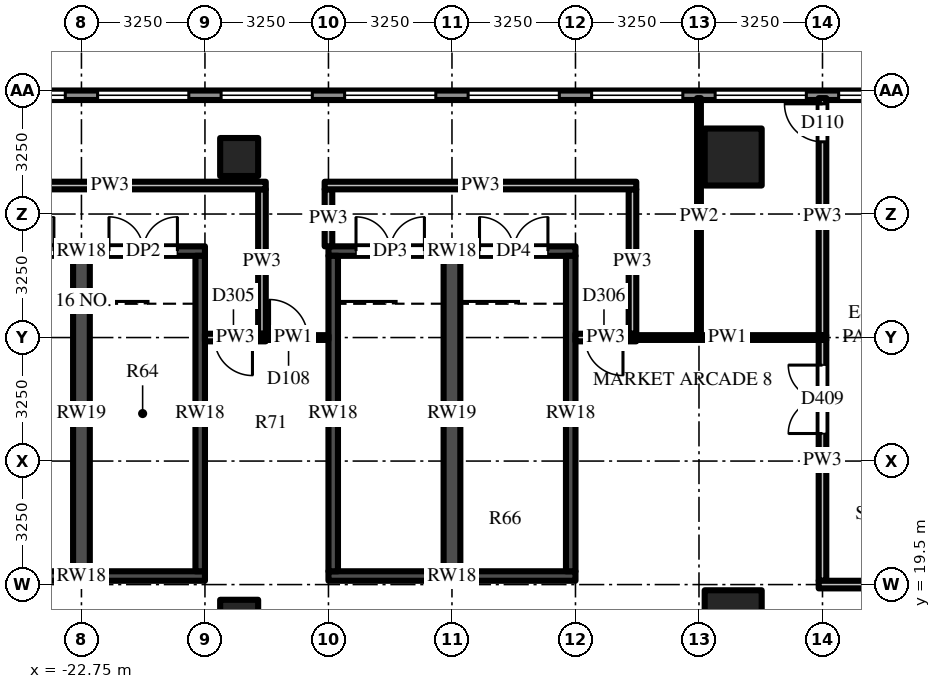
"""IFC4 building model, lengths in metres.
Left out: names, types, materials, properties, quantities, classifications, styles, units other than length and angle.
Written with IfcOpenShell. Run it as: python <this file> out.ifc"""

import sys

from ifc_helpers import new_model, si_unit, direction, frame, frame_2d, origin, origin_2d, place, context, subcontext, project, spatial, rectangle, extrude, source, transform, mapped, element, fill, save


model = new_model("IFC4")
c1 = context("Model", 3, precision=1e-05, world=origin(), true_north=direction((0.0, 1.0)))
c2 = subcontext(c1, "Body", "Model", "MODEL_VIEW")
j1 = project(units=[si_unit("LENGTHUNIT", "METRE"), si_unit("PLANEANGLEUNIT", "RADIAN")], contexts=[c1])
p1 = place(None, origin())
s1 = spatial("IfcSite", under=j1, at=p1, CompositionType="ELEMENT")
p2 = place(p1, origin())
s2 = spatial("IfcBuilding", under=s1, at=p2, CompositionType="ELEMENT")
p3 = place(p2, frame((0.0, 0.0, 29.0)))
s3 = spatial("IfcBuildingStorey", under=s2, at=p3, CompositionType="ELEMENT", Elevation=29.0)
m1 = source(origin(), c2, "Body", "SweptSolid", [
    extrude(rectangle(XDim=1.5, YDim=1.5, at=origin_2d()), origin(), (0.0, 0.0, 1.0), 5.0),
])
for number, where, z_axis, x_axis in (
    (1, (-5.6, 18.6, 0.0), (0.0, 0.0, 1.0), (1.0, 0.0, 0.0)),
    (2, (-5.6, 30.75, 0.0), (0.0, 0.0, 1.0), (1.0, 0.0, 0.0)),
):
    element("IfcColumn", number, at=place(p3, frame(where, z_axis=z_axis, x_axis=x_axis)), inside=s3, PredefinedType="COLUMN", context=c2, shape_type="MappedRepresentation", body=[
        mapped(m1, transform((0.0, 0.0, 0.0))),
    ])
m2 = source(origin(), c2, "Body", "SweptSolid", [
    extrude(rectangle(XDim=1.0, YDim=1.0, at=origin_2d()), origin(), (0.0, 0.0, 1.0), 5.0),
])
for number, where, z_axis, x_axis in (
    (3, (-18.6, 18.6, 0.0), (0.0, 0.0, 1.0), (1.0, 0.0, 0.0)),
    (4, (-18.6, 30.75, 0.0), (0.0, 0.0, 1.0), (1.0, 0.0, 0.0)),
):
    element("IfcColumn", number, at=place(p3, frame(where, z_axis=z_axis, x_axis=x_axis)), inside=s3, PredefinedType="COLUMN", context=c2, shape_type="MappedRepresentation", body=[
        mapped(m2, transform((0.0, 0.0, 0.0))),
    ])
m3 = source(origin(), c2, "Body", "SweptSolid", [
    extrude(rectangle(XDim=6.5, YDim=0.25, at=frame_2d((3.25, 0.0))), origin(), (0.0, 0.0, 1.0), 4.65),
])
p4 = place(p3, frame((-26.0, 28.275, 0.0), z_axis=(0.0, 0.0, 1.0), x_axis=(1.0, 0.0, 0.0)))
e5 = element("IfcWall", 5, at=p4, inside=s3, PredefinedType="SHEAR", context=c2, shape_type="MappedRepresentation", body=[
    mapped(m3, transform((0.0, 0.0, 0.0))),
])
m4 = source(origin(), c2, "Body", "SweptSolid", [
    extrude(rectangle(XDim=1.8, YDim=2.1, at=frame_2d((0.9, 1.05))), frame((0.0, 0.135, 0.0), z_axis=(0.0, -1.0, 0.0), x_axis=(1.0, 0.0, 0.0)), (0.0, 0.0, 1.0), 0.27),
])
p5 = place(p4, frame((0.725, 0.0, 0.0)))
e6 = element("IfcOpeningElement", 6, at=p5, cuts=e5, PredefinedType="OPENING", context=c2, shape_type="MappedRepresentation", body=[
    mapped(m4, transform((0.0, 0.0, 0.0))),
])
p6 = place(p4, frame((3.975, 0.0, 0.0)))
e7 = element("IfcOpeningElement", 7, at=p6, cuts=e5, PredefinedType="OPENING", context=c2, shape_type="MappedRepresentation", body=[
    mapped(m4, transform((0.0, 0.0, 0.0))),
])
p7 = place(p3, frame((-26.0, 19.725, 0.0), z_axis=(0.0, 0.0, 1.0), x_axis=(1.0, 0.0, 0.0)))
e8 = element("IfcWall", 8, at=p7, inside=s3, PredefinedType="SHEAR", context=c2, shape_type="MappedRepresentation", body=[
    mapped(m3, transform((0.0, 0.0, 0.0))),
])
m5 = source(origin(), c2, "Body", "SweptSolid", [
    extrude(rectangle(XDim=8.3, YDim=0.25, at=frame_2d((4.15, 0.0))), origin(), (0.0, 0.0, 1.0), 4.65),
])
p8 = place(p3, frame((-19.625, 19.85, 0.0), z_axis=(0.0, 0.0, 1.0), x_axis=(0.0, 1.0, 0.0)))
e9 = element("IfcWall", 9, at=p8, inside=s3, PredefinedType="SHEAR", context=c2, shape_type="MappedRepresentation", body=[
    mapped(m5, transform((0.0, 0.0, 0.0))),
])
m6 = source(origin(), c2, "Body", "SweptSolid", [
    extrude(rectangle(XDim=8.3, YDim=0.44, at=frame_2d((4.15, 0.0))), origin(), (0.0, 0.0, 1.0), 4.65),
])
p9 = place(p3, frame((-22.75, 19.85, 0.0), z_axis=(0.0, 0.0, 1.0), x_axis=(0.0, 1.0, 0.0)))
e10 = element("IfcWall", 10, at=p9, inside=s3, PredefinedType="SHEAR", context=c2, shape_type="MappedRepresentation", body=[
    mapped(m6, transform((0.0, 0.0, 0.0))),
])
p10 = place(p3, frame((-16.25, 28.275, 0.0), z_axis=(0.0, 0.0, 1.0), x_axis=(1.0, 0.0, 0.0)))
e11 = element("IfcWall", 11, at=p10, inside=s3, PredefinedType="SHEAR", context=c2, shape_type="MappedRepresentation", body=[
    mapped(m3, transform((0.0, 0.0, 0.0))),
])
p11 = place(p10, frame((0.725, 0.0, 0.0)))
e12 = element("IfcOpeningElement", 12, at=p11, cuts=e11, PredefinedType="OPENING", context=c2, shape_type="MappedRepresentation", body=[
    mapped(m4, transform((0.0, 0.0, 0.0))),
])
p12 = place(p10, frame((3.975, 0.0, 0.0)))
e13 = element("IfcOpeningElement", 13, at=p12, cuts=e11, PredefinedType="OPENING", context=c2, shape_type="MappedRepresentation", body=[
    mapped(m4, transform((0.0, 0.0, 0.0))),
])
p13 = place(p3, frame((-16.25, 19.725, 0.0), z_axis=(0.0, 0.0, 1.0), x_axis=(1.0, 0.0, 0.0)))
e14 = element("IfcWall", 14, at=p13, inside=s3, PredefinedType="SHEAR", context=c2, shape_type="MappedRepresentation", body=[
    mapped(m3, transform((0.0, 0.0, 0.0))),
])
for number, where, z_axis, x_axis in (
    (15, (-16.125, 19.85, 0.0), (0.0, 0.0, 1.0), (0.0, 1.0, 0.0)),
    (16, (-9.875, 19.85, 0.0), (0.0, 0.0, 1.0), (0.0, 1.0, 0.0)),
):
    element("IfcWall", number, at=place(p3, frame(where, z_axis=z_axis, x_axis=x_axis)), inside=s3, PredefinedType="SHEAR", context=c2, shape_type="MappedRepresentation", body=[
        mapped(m5, transform((0.0, 0.0, 0.0))),
    ])
p14 = place(p3, frame((-13.0, 19.85, 0.0), z_axis=(0.0, 0.0, 1.0), x_axis=(0.0, 1.0, 0.0)))
e17 = element("IfcWall", 17, at=p14, inside=s3, PredefinedType="SHEAR", context=c2, shape_type="MappedRepresentation", body=[
    mapped(m6, transform((0.0, 0.0, 0.0))),
])
m7 = source(origin(), c2, "Body", "SweptSolid", [
    extrude(rectangle(XDim=58.5, YDim=0.25, at=frame_2d((29.25, 0.0))), origin(), (0.0, 0.0, 1.0), 4.65),
])
p15 = place(p3, frame((29.25, 32.375, 0.0), z_axis=(0.0, 0.0, 1.0), x_axis=(-1.0, 0.0, 0.0)))
e18 = element("IfcWall", 18, at=p15, inside=s3, PredefinedType="SOLIDWALL", context=c2, shape_type="MappedRepresentation", body=[
    mapped(m7, transform((0.0, 0.0, 0.0))),
])
m8 = source(origin(), c2, "Body", "SweptSolid", [
    extrude(rectangle(XDim=2.4, YDim=3.3, at=frame_2d((1.2, 1.65))), frame((0.0, 0.135, 0.0), z_axis=(0.0, -1.0, 0.0), x_axis=(1.0, 0.0, 0.0)), (0.0, 0.0, 1.0), 0.27),
])
p16 = place(p15, frame((0.425, 0.0, 0.6)))
e19 = element("IfcOpeningElement", 19, at=p16, cuts=e18, PredefinedType="OPENING", context=c2, shape_type="MappedRepresentation", body=[
    mapped(m8, transform((0.0, 0.0, 0.0))),
])
p17 = place(p15, frame((3.675, 0.0, 0.6)))
e20 = element("IfcOpeningElement", 20, at=p17, cuts=e18, PredefinedType="OPENING", context=c2, shape_type="MappedRepresentation", body=[
    mapped(m8, transform((0.0, 0.0, 0.0))),
])
p18 = place(p15, frame((6.925, 0.0, 0.6)))
e21 = element("IfcOpeningElement", 21, at=p18, cuts=e18, PredefinedType="OPENING", context=c2, shape_type="MappedRepresentation", body=[
    mapped(m8, transform((0.0, 0.0, 0.0))),
])
p19 = place(p15, frame((10.175, 0.0, 0.6)))
e22 = element("IfcOpeningElement", 22, at=p19, cuts=e18, PredefinedType="OPENING", context=c2, shape_type="MappedRepresentation", body=[
    mapped(m8, transform((0.0, 0.0, 0.0))),
])
p20 = place(p15, frame((13.425, 0.0, 0.6)))
e23 = element("IfcOpeningElement", 23, at=p20, cuts=e18, PredefinedType="OPENING", context=c2, shape_type="MappedRepresentation", body=[
    mapped(m8, transform((0.0, 0.0, 0.0))),
])
p21 = place(p15, frame((16.675, 0.0, 0.6)))
e24 = element("IfcOpeningElement", 24, at=p21, cuts=e18, PredefinedType="OPENING", context=c2, shape_type="MappedRepresentation", body=[
    mapped(m8, transform((0.0, 0.0, 0.0))),
])
p22 = place(p15, frame((19.925, 0.0, 0.6)))
e25 = element("IfcOpeningElement", 25, at=p22, cuts=e18, PredefinedType="OPENING", context=c2, shape_type="MappedRepresentation", body=[
    mapped(m8, transform((0.0, 0.0, 0.0))),
])
p23 = place(p15, frame((23.175, 0.0, 0.6)))
e26 = element("IfcOpeningElement", 26, at=p23, cuts=e18, PredefinedType="OPENING", context=c2, shape_type="MappedRepresentation", body=[
    mapped(m8, transform((0.0, 0.0, 0.0))),
])
p24 = place(p15, frame((26.425, 0.0, 0.6)))
e27 = element("IfcOpeningElement", 27, at=p24, cuts=e18, PredefinedType="OPENING", context=c2, shape_type="MappedRepresentation", body=[
    mapped(m8, transform((0.0, 0.0, 0.0))),
])
p25 = place(p15, frame((29.675, 0.0, 0.6)))
e28 = element("IfcOpeningElement", 28, at=p25, cuts=e18, PredefinedType="OPENING", context=c2, shape_type="MappedRepresentation", body=[
    mapped(m8, transform((0.0, 0.0, 0.0))),
])
p26 = place(p15, frame((32.925, 0.0, 0.6)))
e29 = element("IfcOpeningElement", 29, at=p26, cuts=e18, PredefinedType="OPENING", context=c2, shape_type="MappedRepresentation", body=[
    mapped(m8, transform((0.0, 0.0, 0.0))),
])
p27 = place(p15, frame((36.175, 0.0, 0.6)))
e30 = element("IfcOpeningElement", 30, at=p27, cuts=e18, PredefinedType="OPENING", context=c2, shape_type="MappedRepresentation", body=[
    mapped(m8, transform((0.0, 0.0, 0.0))),
])
p28 = place(p15, frame((39.425, 0.0, 0.6)))
e31 = element("IfcOpeningElement", 31, at=p28, cuts=e18, PredefinedType="OPENING", context=c2, shape_type="MappedRepresentation", body=[
    mapped(m8, transform((0.0, 0.0, 0.0))),
])
p29 = place(p15, frame((42.675, 0.0, 0.6)))
e32 = element("IfcOpeningElement", 32, at=p29, cuts=e18, PredefinedType="OPENING", context=c2, shape_type="MappedRepresentation", body=[
    mapped(m8, transform((0.0, 0.0, 0.0))),
])
p30 = place(p15, frame((45.925, 0.0, 0.6)))
e33 = element("IfcOpeningElement", 33, at=p30, cuts=e18, PredefinedType="OPENING", context=c2, shape_type="MappedRepresentation", body=[
    mapped(m8, transform((0.0, 0.0, 0.0))),
])
p31 = place(p15, frame((49.175, 0.0, 0.6)))
e34 = element("IfcOpeningElement", 34, at=p31, cuts=e18, PredefinedType="OPENING", context=c2, shape_type="MappedRepresentation", body=[
    mapped(m8, transform((0.0, 0.0, 0.0))),
])
p32 = place(p15, frame((52.425, 0.0, 0.6)))
e35 = element("IfcOpeningElement", 35, at=p32, cuts=e18, PredefinedType="OPENING", context=c2, shape_type="MappedRepresentation", body=[
    mapped(m8, transform((0.0, 0.0, 0.0))),
])
p33 = place(p15, frame((55.675, 0.0, 0.6)))
e36 = element("IfcOpeningElement", 36, at=p33, cuts=e18, PredefinedType="OPENING", context=c2, shape_type="MappedRepresentation", body=[
    mapped(m8, transform((0.0, 0.0, 0.0))),
])
m9 = source(origin(), c2, "Body", "SweptSolid", [
    extrude(rectangle(XDim=3.8, YDim=0.2, at=frame_2d((1.9, 0.0))), origin(), (0.0, 0.0, 1.0), 4.224),
])
p34 = place(p3, frame((-18.0, 26.1, 0.0), z_axis=(0.0, 0.0, 1.0), x_axis=(0.0, 1.0, 0.0)))
e37 = element("IfcWall", 37, at=p34, inside=s3, PredefinedType="PARTITIONING", context=c2, shape_type="MappedRepresentation", body=[
    mapped(m9, transform((0.0, 0.0, 0.0))),
])
m10 = source(origin(), c2, "Body", "SweptSolid", [
    extrude(rectangle(XDim=1.5, YDim=0.2, at=frame_2d((0.75, 0.0))), origin(), (0.0, 0.0, 1.0), 4.65),
])
p35 = place(p3, frame((-16.25, 28.4, 0.0), z_axis=(0.0, 0.0, 1.0), x_axis=(0.0, 1.0, 0.0)))
e38 = element("IfcWall", 38, at=p35, inside=s3, PredefinedType="PARTITIONING", context=c2, shape_type="MappedRepresentation", body=[
    mapped(m10, transform((0.0, 0.0, 0.0))),
])
p36 = place(p3, frame((-8.25, 26.1, 0.0), z_axis=(0.0, 0.0, 1.0), x_axis=(0.0, 1.0, 0.0)))
e39 = element("IfcWall", 39, at=p36, inside=s3, PredefinedType="PARTITIONING", context=c2, shape_type="MappedRepresentation", body=[
    mapped(m9, transform((0.0, 0.0, 0.0))),
])
m11 = source(origin(), c2, "Body", "SweptSolid", [
    extrude(rectangle(XDim=6.238, YDim=0.1, at=frame_2d((3.119, 0.0))), origin(), (0.0, 0.0, 1.0), 3.73),
])
p37 = place(p3, frame((-6.5, 26.062, 0.0), z_axis=(0.0, 0.0, 1.0), x_axis=(0.0, 1.0, 0.0)))
e40 = element("IfcWall", 40, at=p37, inside=s3, PredefinedType="PARTITIONING", context=c2, shape_type="MappedRepresentation", body=[
    mapped(m11, transform((0.0, 0.0, 0.0))),
])
m12 = source(origin(), c2, "Body", "SweptSolid", [
    extrude(rectangle(XDim=3.188, YDim=0.2, at=frame_2d((1.594, 0.0))), origin(), (0.0, 0.0, 1.0), 4.65),
])
p38 = place(p3, frame((-3.25, 22.75, 0.0), z_axis=(0.0, 0.0, 1.0), x_axis=(0.0, 1.0, 0.0)))
e41 = element("IfcWall", 41, at=p38, inside=s3, PredefinedType="PARTITIONING", context=c2, shape_type="MappedRepresentation", body=[
    mapped(m12, transform((0.0, 0.0, 0.0))),
])
m13 = source(origin(), c2, "Body", "SweptSolid", [
    extrude(rectangle(XDim=1.8, YDim=2.1, at=frame_2d((0.9, 1.05))), frame((0.0, 0.11, 0.0), z_axis=(0.0, -1.0, 0.0), x_axis=(1.0, 0.0, 0.0)), (0.0, 0.0, 1.0), 0.22),
])
p39 = place(p38, frame((0.725, 0.0, 0.0)))
e42 = element("IfcOpeningElement", 42, at=p39, cuts=e41, PredefinedType="OPENING", context=c2, shape_type="MappedRepresentation", body=[
    mapped(m13, transform((0.0, 0.0, 0.0))),
])
m14 = source(origin(), c2, "Body", "SweptSolid", [
    extrude(rectangle(XDim=3.15, YDim=0.2, at=frame_2d((1.575, 0.0))), origin(), (0.0, 0.0, 1.0), 4.65),
])
p40 = place(p3, frame((-3.25, 19.6, 0.0), z_axis=(0.0, 0.0, 1.0), x_axis=(0.0, 1.0, 0.0)))
e43 = element("IfcWall", 43, at=p40, inside=s3, PredefinedType="PARTITIONING", context=c2, shape_type="MappedRepresentation", body=[
    mapped(m14, transform((0.0, 0.0, 0.0))),
])
m15 = source(origin(), c2, "Body", "SweptSolid", [
    extrude(rectangle(XDim=6.238, YDim=0.2, at=frame_2d((3.119, 0.0))), origin(), (0.0, 0.0, 1.0), 3.73),
])
p41 = place(p3, frame((-3.25, 26.062, 0.0), z_axis=(0.0, 0.0, 1.0), x_axis=(0.0, 1.0, 0.0)))
e44 = element("IfcWall", 44, at=p41, inside=s3, PredefinedType="PARTITIONING", context=c2, shape_type="MappedRepresentation", body=[
    mapped(m15, transform((0.0, 0.0, 0.0))),
])
m16 = source(origin(), c2, "Body", "SweptSolid", [
    extrude(rectangle(XDim=1.0, YDim=2.1, at=frame_2d((0.5, 1.05))), frame((0.0, 0.11, 0.0), z_axis=(0.0, -1.0, 0.0), x_axis=(1.0, 0.0, 0.0)), (0.0, 0.0, 1.0), 0.22),
])
p42 = place(p41, frame((5.087, 0.0, 0.0)))
e45 = element("IfcOpeningElement", 45, at=p42, cuts=e44, PredefinedType="OPENING", context=c2, shape_type="MappedRepresentation", body=[
    mapped(m16, transform((0.0, 0.0, 0.0))),
])
m17 = source(origin(), c2, "Body", "SweptSolid", [
    extrude(rectangle(XDim=1.85, YDim=0.2, at=frame_2d((0.925, 0.0))), origin(), (0.0, 0.0, 1.0), 3.947),
])
p43 = place(p3, frame((-1.5, 19.5, 0.0), z_axis=(0.0, 0.0, 1.0), x_axis=(-1.0, 0.0, 0.0)))
e46 = element("IfcWall", 46, at=p43, inside=s3, PredefinedType="PARTITIONING", context=c2, shape_type="MappedRepresentation", body=[
    mapped(m17, transform((0.0, 0.0, 0.0))),
])
m18 = source(origin(), c2, "Body", "SweptSolid", [
    extrude(rectangle(XDim=1.6, YDim=0.2, at=frame_2d((0.8, 0.0))), origin(), (0.0, 0.0, 1.0), 3.712),
])
p44 = place(p3, frame((-17.9, 26.0, 0.0), z_axis=(0.0, 0.0, 1.0), x_axis=(-1.0, 0.0, 0.0)))
e47 = element("IfcWall", 47, at=p44, inside=s3, PredefinedType="PARTITIONING", context=c2, shape_type="MappedRepresentation", body=[
    mapped(m18, transform((0.0, 0.0, 0.0))),
])
p45 = place(p44, frame((0.35, 0.0, 0.0)))
e48 = element("IfcOpeningElement", 48, at=p45, cuts=e47, PredefinedType="OPENING", context=c2, shape_type="MappedRepresentation", body=[
    mapped(m16, transform((0.0, 0.0, 0.0))),
])
m19 = source(origin(), c2, "Body", "SweptSolid", [
    extrude(rectangle(XDim=1.6, YDim=0.2, at=frame_2d((0.8, 0.0))), origin(), (0.0, 0.0, 1.0), 4.65),
])
p46 = place(p3, frame((-8.15, 26.0, 0.0), z_axis=(0.0, 0.0, 1.0), x_axis=(-1.0, 0.0, 0.0)))
e49 = element("IfcWall", 49, at=p46, inside=s3, PredefinedType="PARTITIONING", context=c2, shape_type="MappedRepresentation", body=[
    mapped(m19, transform((0.0, 0.0, 0.0))),
])
p47 = place(p46, frame((0.35, 0.0, 0.0)))
e50 = element("IfcOpeningElement", 50, at=p47, cuts=e49, PredefinedType="OPENING", context=c2, shape_type="MappedRepresentation", body=[
    mapped(m16, transform((0.0, 0.0, 0.0))),
])
m20 = source(origin(), c2, "Body", "SweptSolid", [
    extrude(rectangle(XDim=1.85, YDim=0.125, at=frame_2d((0.925, 0.0))), origin(), (0.0, 0.0, 1.0), 4.65),
])
p48 = place(p3, frame((-18.1, 26.0, 0.0), z_axis=(0.0, 0.0, 1.0), x_axis=(1.0, 0.0, 0.0)))
e51 = element("IfcWall", 51, at=p48, inside=s3, PredefinedType="PARTITIONING", context=c2, shape_type="MappedRepresentation", body=[
    mapped(m20, transform((0.0, 0.0, 0.0))),
])
m21 = source(origin(), c2, "Body", "SweptSolid", [
    extrude(rectangle(XDim=1.0, YDim=2.1, at=frame_2d((0.5, 1.05))), frame((0.0, 0.073, 0.0), z_axis=(0.0, -1.0, 0.0), x_axis=(1.0, 0.0, 0.0)), (0.0, 0.0, 1.0), 0.145),
])
p49 = place(p48, frame((0.3, 0.0, 0.0)))
e52 = element("IfcOpeningElement", 52, at=p49, cuts=e51, PredefinedType="OPENING", context=c2, shape_type="MappedRepresentation", body=[
    mapped(m21, transform((0.0, 0.0, 0.0))),
])
m22 = source(origin(), c2, "Body", "SweptSolid", [
    extrude(rectangle(XDim=5.2, YDim=0.125, at=frame_2d((2.6, 0.0))), origin(), (0.0, 0.0, 1.0), 2.83),
])
p50 = place(p3, frame((-8.35, 26.0, 0.0), z_axis=(0.0, 0.0, 1.0), x_axis=(1.0, 0.0, 0.0)))
e53 = element("IfcWall", 53, at=p50, inside=s3, PredefinedType="PARTITIONING", context=c2, shape_type="MappedRepresentation", body=[
    mapped(m22, transform((0.0, 0.0, 0.0))),
])
m23 = source(origin(), c2, "Body", "SweptSolid", [
    extrude(rectangle(XDim=8.2, YDim=0.2, at=frame_2d((4.1, 0.0))), origin(), (0.0, 0.0, 1.0), 3.712),
])
p51 = place(p3, frame((-17.9, 30.0, 0.0), z_axis=(0.0, 0.0, 1.0), x_axis=(-1.0, 0.0, 0.0)))
e54 = element("IfcWall", 54, at=p51, inside=s3, PredefinedType="PARTITIONING", context=c2, shape_type="MappedRepresentation", body=[
    mapped(m23, transform((0.0, 0.0, 0.0))),
])
m24 = source(origin(), c2, "Body", "SweptSolid", [
    extrude(rectangle(XDim=8.2, YDim=0.2, at=frame_2d((4.1, 0.0))), origin(), (0.0, 0.0, 1.0), 4.65),
])
p52 = place(p3, frame((-8.15, 30.0, 0.0), z_axis=(0.0, 0.0, 1.0), x_axis=(-1.0, 0.0, 0.0)))
e55 = element("IfcWall", 55, at=p52, inside=s3, PredefinedType="PARTITIONING", context=c2, shape_type="MappedRepresentation", body=[
    mapped(m24, transform((0.0, 0.0, 0.0))),
])
m25 = source(origin(), c2, "Body", "SweptSolid", [
    extrude(rectangle(XDim=1.8, YDim=2.1, at=frame_2d((0.9, 1.05))), frame((0.0, 0.025, 0.0), z_axis=(0.0, -1.0, 0.0), x_axis=(1.0, 0.0, 0.0)), (0.0, 0.0, 1.0), 0.05),
])
p53 = place(p5, origin())
e56 = element("IfcDoor", 56, at=p53, inside=s3, OperationType="DOUBLE_DOOR_SINGLE_SWING", PredefinedType="DOOR", context=c2, shape_type="MappedRepresentation", body=[
    mapped(m25, transform((0.0, 0.0, 0.0))),
])
fill(e6, e56)
p54 = place(p6, origin())
e57 = element("IfcDoor", 57, at=p54, inside=s3, OperationType="DOUBLE_DOOR_SINGLE_SWING", PredefinedType="DOOR", context=c2, shape_type="MappedRepresentation", body=[
    mapped(m25, transform((0.0, 0.0, 0.0))),
])
fill(e7, e57)
p55 = place(p11, origin())
e58 = element("IfcDoor", 58, at=p55, inside=s3, OperationType="DOUBLE_DOOR_SINGLE_SWING", PredefinedType="DOOR", context=c2, shape_type="MappedRepresentation", body=[
    mapped(m25, transform((0.0, 0.0, 0.0))),
])
fill(e12, e58)
p56 = place(p12, origin())
e59 = element("IfcDoor", 59, at=p56, inside=s3, OperationType="DOUBLE_DOOR_SINGLE_SWING", PredefinedType="DOOR", context=c2, shape_type="MappedRepresentation", body=[
    mapped(m25, transform((0.0, 0.0, 0.0))),
])
fill(e13, e59)
m26 = source(origin(), c2, "Body", "SweptSolid", [
    extrude(rectangle(XDim=2.4, YDim=3.3, at=frame_2d((1.2, 1.65))), frame((0.0, 0.03, 0.0), z_axis=(0.0, -1.0, 0.0), x_axis=(1.0, 0.0, 0.0)), (0.0, 0.0, 1.0), 0.06),
])
p57 = place(p25, origin())
e60 = element("IfcWindow", 60, at=p57, inside=s3, PartitioningType="SINGLE_PANEL", PredefinedType="WINDOW", context=c2, shape_type="MappedRepresentation", body=[
    mapped(m26, transform((0.0, 0.0, 0.0))),
])
fill(e28, e60)
p58 = place(p26, origin())
e61 = element("IfcWindow", 61, at=p58, inside=s3, PartitioningType="SINGLE_PANEL", PredefinedType="WINDOW", context=c2, shape_type="MappedRepresentation", body=[
    mapped(m26, transform((0.0, 0.0, 0.0))),
])
fill(e29, e61)
p59 = place(p27, origin())
e62 = element("IfcWindow", 62, at=p59, inside=s3, PartitioningType="SINGLE_PANEL", PredefinedType="WINDOW", context=c2, shape_type="MappedRepresentation", body=[
    mapped(m26, transform((0.0, 0.0, 0.0))),
])
fill(e30, e62)
p60 = place(p28, origin())
e63 = element("IfcWindow", 63, at=p60, inside=s3, PartitioningType="SINGLE_PANEL", PredefinedType="WINDOW", context=c2, shape_type="MappedRepresentation", body=[
    mapped(m26, transform((0.0, 0.0, 0.0))),
])
fill(e31, e63)
p61 = place(p29, origin())
e64 = element("IfcWindow", 64, at=p61, inside=s3, PartitioningType="SINGLE_PANEL", PredefinedType="WINDOW", context=c2, shape_type="MappedRepresentation", body=[
    mapped(m26, transform((0.0, 0.0, 0.0))),
])
fill(e32, e64)
p62 = place(p30, origin())
e65 = element("IfcWindow", 65, at=p62, inside=s3, PartitioningType="SINGLE_PANEL", PredefinedType="WINDOW", context=c2, shape_type="MappedRepresentation", body=[
    mapped(m26, transform((0.0, 0.0, 0.0))),
])
fill(e33, e65)
p63 = place(p31, origin())
e66 = element("IfcWindow", 66, at=p63, inside=s3, PartitioningType="SINGLE_PANEL", PredefinedType="WINDOW", context=c2, shape_type="MappedRepresentation", body=[
    mapped(m26, transform((0.0, 0.0, 0.0))),
])
fill(e34, e66)
p64 = place(p32, origin())
e67 = element("IfcWindow", 67, at=p64, inside=s3, PartitioningType="SINGLE_PANEL", PredefinedType="WINDOW", context=c2, shape_type="MappedRepresentation", body=[
    mapped(m26, transform((0.0, 0.0, 0.0))),
])
fill(e35, e67)
p65 = place(p39, origin())
e68 = element("IfcDoor", 68, at=p65, inside=s3, OperationType="DOUBLE_DOOR_SINGLE_SWING", PredefinedType="DOOR", context=c2, shape_type="MappedRepresentation", body=[
    mapped(m25, transform((0.0, 0.0, 0.0))),
])
fill(e42, e68)
m27 = source(origin(), c2, "Body", "SweptSolid", [
    extrude(rectangle(XDim=1.0, YDim=2.1, at=frame_2d((0.5, 1.05))), frame((0.0, 0.025, 0.0), z_axis=(0.0, -1.0, 0.0), x_axis=(1.0, 0.0, 0.0)), (0.0, 0.0, 1.0), 0.05),
])
p66 = place(p45, origin())
e69 = element("IfcDoor", 69, at=p66, inside=s3, OperationType="SINGLE_SWING_LEFT", PredefinedType="DOOR", context=c2, shape_type="MappedRepresentation", body=[
    mapped(m27, transform((0.0, 0.0, 0.0))),
])
fill(e48, e69)
p67 = place(p49, origin())
e70 = element("IfcDoor", 70, at=p67, inside=s3, OperationType="SINGLE_SWING_LEFT", PredefinedType="DOOR", context=c2, shape_type="MappedRepresentation", body=[
    mapped(m27, transform((0.0, 0.0, 0.0))),
])
fill(e52, e70)
p68 = place(p47, origin())
e71 = element("IfcDoor", 71, at=p68, inside=s3, OperationType="SINGLE_SWING_LEFT", PredefinedType="DOOR", context=c2, shape_type="MappedRepresentation", body=[
    mapped(m27, transform((0.0, 0.0, 0.0))),
])
fill(e50, e71)
p69 = place(p42, origin())
e72 = element("IfcDoor", 72, at=p69, inside=s3, OperationType="SINGLE_SWING_RIGHT", PredefinedType="DOOR", context=c2, shape_type="MappedRepresentation", body=[
    mapped(m27, transform((0.0, 0.0, 0.0))),
])
fill(e45, e72)
save(model, sys.argv[1])
